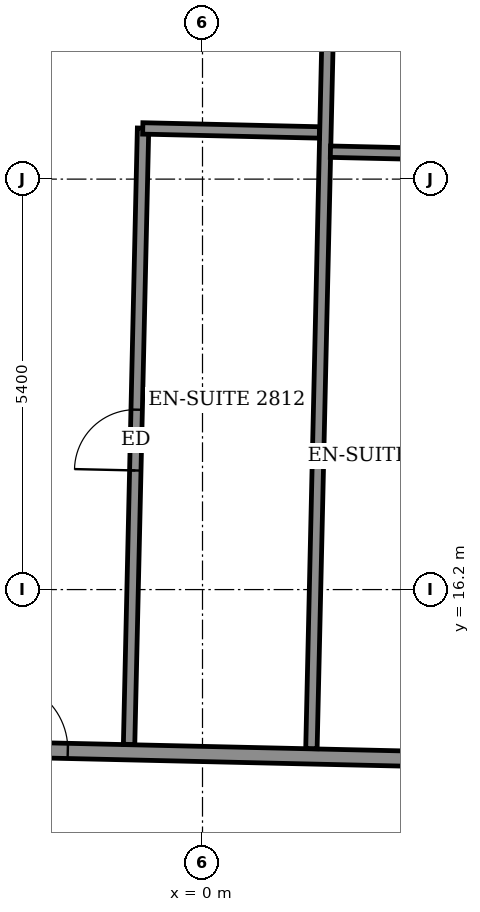
"""IFC4 building model, lengths in metres.
Left out: names, types, materials, properties, quantities, classifications, styles, units other than length and angle.
Written with IfcOpenShell. Run it as: python <this file> out.ifc"""

import sys

from ifc_helpers import new_model, si_unit, direction, frame, frame_2d, origin, place, context, subcontext, project, spatial, rectangle, extrude, element, fill, save


model = new_model("IFC4")
c1 = context("Model", 3, precision=1e-05, world=origin(), true_north=direction((0.0, 1.0)))
c2 = subcontext(c1, "Body", "Model", "MODEL_VIEW")
j1 = project(units=[si_unit("LENGTHUNIT", "METRE"), si_unit("PLANEANGLEUNIT", "RADIAN")], contexts=[c1])
p1 = place(None, origin())
s1 = spatial("IfcSite", under=j1, at=p1, CompositionType="ELEMENT")
p2 = place(p1, origin())
s2 = spatial("IfcBuilding", under=s1, at=p2, CompositionType="ELEMENT")
p3 = place(p2, frame((0.0, 0.0, 112.7)))
s3 = spatial("IfcBuildingStorey", under=s2, at=p3, CompositionType="ELEMENT", Elevation=112.7)
p4 = place(p3, frame((-26.341, 14.635, 0.0), z_axis=(0.0, 0.0, 1.0), x_axis=(0.999742553034, -0.02268981385, 0.0)))
e1 = element("IfcWall", 1, at=p4, inside=s3, PredefinedType="PARTITIONING", context=c2, shape_type="SweptSolid", body=[
    extrude(rectangle(XDim=50.733, YDim=0.2, at=frame_2d((25.366, 0.0))), origin(), (0.0, 0.0, 1.0), 3.05),
])
p5 = place(p4, frame((47.954, 0.0, 0.0)))
e2 = element("IfcOpeningElement", 2, at=p5, cuts=e1, PredefinedType="OPENING", context=c2, shape_type="SweptSolid", body=[
    extrude(rectangle(XDim=1.0, YDim=2.1, at=frame_2d((0.5, 1.05))), frame((0.0, 0.11, 0.0), z_axis=(0.0, -1.0, 0.0), x_axis=(1.0, 0.0, 0.0)), (0.0, 0.0, 1.0), 0.22),
])
p6 = place(p4, frame((43.125, 0.0, 0.0)))
e3 = element("IfcOpeningElement", 3, at=p6, cuts=e1, PredefinedType="OPENING", context=c2, shape_type="SweptSolid", body=[
    extrude(rectangle(XDim=0.9, YDim=2.1, at=frame_2d((0.45, 1.05))), frame((0.0, 0.11, 0.0), z_axis=(0.0, -1.0, 0.0), x_axis=(1.0, 0.0, 0.0)), (0.0, 0.0, 1.0), 0.22),
])
p7 = place(p4, frame((40.7, 0.0, 0.0)))
e4 = element("IfcOpeningElement", 4, at=p7, cuts=e1, PredefinedType="OPENING", context=c2, shape_type="SweptSolid", body=[
    extrude(rectangle(XDim=0.9, YDim=2.1, at=frame_2d((0.45, 1.05))), frame((0.0, 0.11, 0.0), z_axis=(0.0, -1.0, 0.0), x_axis=(1.0, 0.0, 0.0)), (0.0, 0.0, 1.0), 0.22),
])
p8 = place(p4, frame((33.425, 0.0, 0.0)))
e5 = element("IfcOpeningElement", 5, at=p8, cuts=e1, PredefinedType="OPENING", context=c2, shape_type="SweptSolid", body=[
    extrude(rectangle(XDim=0.9, YDim=2.1, at=frame_2d((0.45, 1.05))), frame((0.0, 0.11, 0.0), z_axis=(0.0, -1.0, 0.0), x_axis=(1.0, 0.0, 0.0)), (0.0, 0.0, 1.0), 0.22),
])
p9 = place(p4, frame((30.95, 0.0, 0.0)))
e6 = element("IfcOpeningElement", 6, at=p9, cuts=e1, PredefinedType="OPENING", context=c2, shape_type="SweptSolid", body=[
    extrude(rectangle(XDim=0.9, YDim=2.1, at=frame_2d((0.45, 1.05))), frame((0.0, 0.11, 0.0), z_axis=(0.0, -1.0, 0.0), x_axis=(1.0, 0.0, 0.0)), (0.0, 0.0, 1.0), 0.22),
])
p10 = place(p4, frame((23.675, 0.0, 0.0)))
e7 = element("IfcOpeningElement", 7, at=p10, cuts=e1, PredefinedType="OPENING", context=c2, shape_type="SweptSolid", body=[
    extrude(rectangle(XDim=0.9, YDim=2.1, at=frame_2d((0.45, 1.05))), frame((0.0, 0.11, 0.0), z_axis=(0.0, -1.0, 0.0), x_axis=(1.0, 0.0, 0.0)), (0.0, 0.0, 1.0), 0.22),
])
p11 = place(p4, frame((21.2, 0.0, 0.0)))
e8 = element("IfcOpeningElement", 8, at=p11, cuts=e1, PredefinedType="OPENING", context=c2, shape_type="SweptSolid", body=[
    extrude(rectangle(XDim=0.9, YDim=2.1, at=frame_2d((0.45, 1.05))), frame((0.0, 0.11, 0.0), z_axis=(0.0, -1.0, 0.0), x_axis=(1.0, 0.0, 0.0)), (0.0, 0.0, 1.0), 0.22),
])
p12 = place(p4, frame((13.95, 0.0, 0.0)))
e9 = element("IfcOpeningElement", 9, at=p12, cuts=e1, PredefinedType="OPENING", context=c2, shape_type="SweptSolid", body=[
    extrude(rectangle(XDim=0.9, YDim=2.1, at=frame_2d((0.45, 1.05))), frame((0.0, 0.11, 0.0), z_axis=(0.0, -1.0, 0.0), x_axis=(1.0, 0.0, 0.0)), (0.0, 0.0, 1.0), 0.22),
])
p13 = place(p4, frame((11.475, 0.0, 0.0)))
e10 = element("IfcOpeningElement", 10, at=p13, cuts=e1, PredefinedType="OPENING", context=c2, shape_type="SweptSolid", body=[
    extrude(rectangle(XDim=0.9, YDim=2.1, at=frame_2d((0.45, 1.05))), frame((0.0, 0.11, 0.0), z_axis=(0.0, -1.0, 0.0), x_axis=(1.0, 0.0, 0.0)), (0.0, 0.0, 1.0), 0.22),
])
p14 = place(p4, frame((1.4, 0.0, 0.0)))
e11 = element("IfcOpeningElement", 11, at=p14, cuts=e1, PredefinedType="OPENING", context=c2, shape_type="SweptSolid", body=[
    extrude(rectangle(XDim=1.0, YDim=2.1, at=frame_2d((0.5, 1.05))), frame((0.0, 0.11, 0.0), z_axis=(0.0, -1.0, 0.0), x_axis=(1.0, 0.0, 0.0)), (0.0, 0.0, 1.0), 0.22),
])
p15 = place(p4, frame((6.625, 0.0, 0.0)))
e12 = element("IfcOpeningElement", 12, at=p15, cuts=e1, PredefinedType="OPENING", context=c2, shape_type="SweptSolid", body=[
    extrude(rectangle(XDim=0.9, YDim=2.1, at=frame_2d((0.45, 1.05))), frame((0.0, 0.11, 0.0), z_axis=(0.0, -1.0, 0.0), x_axis=(1.0, 0.0, 0.0)), (0.0, 0.0, 1.0), 0.22),
])
p16 = place(p3, frame((-0.966, 14.163, 0.0), z_axis=(0.0, 0.0, 1.0), x_axis=(0.022698155442, 0.999742363682, 0.0)))
e13 = element("IfcWall", 13, at=p16, inside=s3, PredefinedType="PARTITIONING", context=c2, shape_type="SweptSolid", body=[
    extrude(rectangle(XDim=8.11, YDim=0.15, at=frame_2d((4.055, 0.0))), origin(), (0.0, 0.0, 1.0), 3.05),
])
p17 = place(p16, frame((3.605, 0.0, 0.0)))
e14 = element("IfcOpeningElement", 14, at=p17, cuts=e13, PredefinedType="OPENING", context=c2, shape_type="SweptSolid", body=[
    extrude(rectangle(XDim=0.8, YDim=2.1, at=frame_2d((0.4, 1.05))), frame((0.0, 0.085, 0.0), z_axis=(0.0, -1.0, 0.0), x_axis=(1.0, 0.0, 0.0)), (0.0, 0.0, 1.0), 0.17),
])
p18 = place(p3, frame((1.433, 14.108, 0.0), z_axis=(0.0, 0.0, 1.0), x_axis=(0.022686732602, 0.99974262296, 0.0)))
e15 = element("IfcWall", 15, at=p18, inside=s3, PredefinedType="PARTITIONING", context=c2, shape_type="SweptSolid", body=[
    extrude(rectangle(XDim=11.676, YDim=0.15, at=frame_2d((5.838, 0.0))), origin(), (0.0, 0.0, 1.0), 2.55),
])
for number, where, z_axis, x_axis in (
    (16, (1.683, 21.961, 0.0), (0.0, 0.0, 1.0), (1.0, -0.023, 0.0)),
    (17, (-0.786, 22.267, 0.0), (0.0, 0.0, 1.0), (1.0, -0.023, 0.0)),
):
    element("IfcWall", number, at=place(p3, frame(where, z_axis=z_axis, x_axis=x_axis)), inside=s3, PredefinedType="PARTITIONING", context=c2, shape_type="SweptSolid", body=[
        extrude(rectangle(XDim=2.324, YDim=0.15, at=frame_2d((1.162, 0.0))), origin(), (0.0, 0.0, 1.0), 3.05),
    ])
p19 = place(p10, origin())
e18 = element("IfcDoor", 18, at=p19, inside=s3, OperationType="SINGLE_SWING_RIGHT", PredefinedType="DOOR", context=c2, shape_type="SweptSolid", body=[
    extrude(rectangle(XDim=0.9, YDim=2.1, at=frame_2d((0.45, 1.05))), frame((0.0, 0.025, 0.0), z_axis=(0.0, -1.0, 0.0), x_axis=(1.0, 0.0, 0.0)), (0.0, 0.0, 1.0), 0.05),
])
fill(e7, e18)
p20 = place(p17, origin())
e19 = element("IfcDoor", 19, at=p20, inside=s3, OperationType="SINGLE_SWING_RIGHT", PredefinedType="DOOR", context=c2, shape_type="SweptSolid", body=[
    extrude(rectangle(XDim=0.8, YDim=2.1, at=frame_2d((0.4, 1.05))), frame((0.0, 0.025, 0.0), z_axis=(0.0, -1.0, 0.0), x_axis=(1.0, 0.0, 0.0)), (0.0, 0.0, 1.0), 0.05),
])
fill(e14, e19)
save(model, sys.argv[1])
